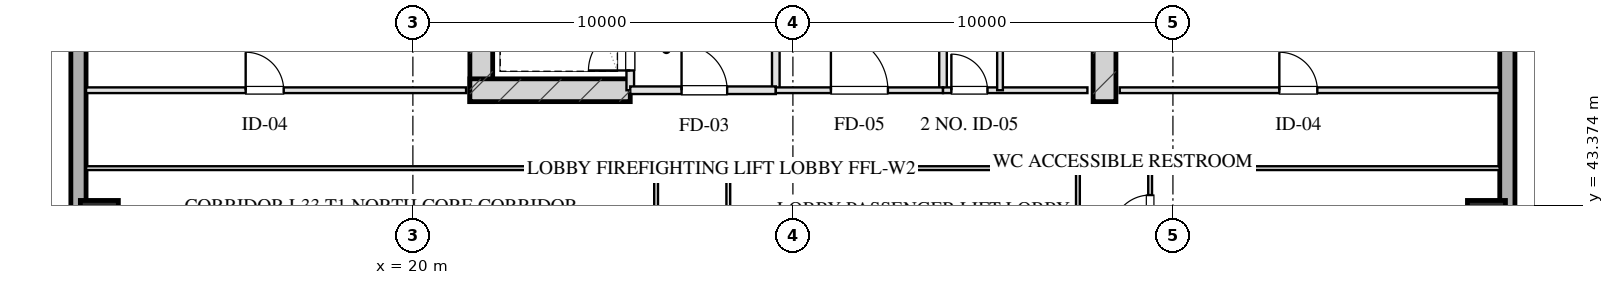
"""IFC4 building model, lengths in metres.
Left out: names, types, materials, properties, quantities, classifications, styles, units other than length and angle.
Written with IfcOpenShell. Run it as: python <this file> out.ifc"""

import sys

from ifc_helpers import new_model, si_unit, direction, frame, frame_2d, origin, origin_2d, place, context, subcontext, project, spatial, rectangle, hollow_rectangle, extrude, element, fill, save


model = new_model("IFC4")
c1 = context("Model", 3, precision=1e-05, world=origin(), true_north=direction((0.0, 1.0)))
c2 = subcontext(c1, "Body", "Model", "MODEL_VIEW")
j1 = project(units=[si_unit("LENGTHUNIT", "METRE"), si_unit("PLANEANGLEUNIT", "RADIAN")], contexts=[c1])
p1 = place(None, origin())
s1 = spatial("IfcSite", under=j1, at=p1, CompositionType="ELEMENT")
p2 = place(p1, origin())
s2 = spatial("IfcBuilding", under=s1, at=p2, CompositionType="ELEMENT")
p3 = place(p2, frame((0.0, 0.0, 127.65)))
s3 = spatial("IfcBuildingStorey", under=s2, at=p3, CompositionType="ELEMENT", Elevation=127.65)
for number, where, z_axis, x_axis in (
    (1, (21.8, 46.1, 0.0), (0.0, 0.0, 1.0), (0.0, 1.0, 0.0)),
    (2, (38.2, 46.1, 0.0), (0.0, 0.0, 1.0), (0.0, 1.0, 0.0)),
):
    element("IfcWall", number, at=place(p3, frame(where, z_axis=z_axis, x_axis=x_axis)), inside=s3, PredefinedType="SHEAR", context=c2, shape_type="SweptSolid", body=[
        extrude(rectangle(XDim=9.48, YDim=0.6, at=frame_2d((4.74, 0.0))), origin(), (0.0, 0.0, 1.0), 3.45),
    ])
p4 = place(p3, frame((21.5, 46.4, 0.0), z_axis=(0.0, 0.0, 1.0), x_axis=(1.0, 0.0, 0.0)))
e3 = element("IfcWall", 3, at=p4, inside=s3, PredefinedType="SHEAR", context=c2, shape_type="SweptSolid", body=[
    extrude(rectangle(XDim=4.22, YDim=0.6, at=frame_2d((2.11, 0.0))), origin(), (0.0, 0.0, 1.0), 3.45),
])
for number, where, z_axis, x_axis in (
    (4, (11.75, 43.0, 0.0), (0.0, 0.0, 1.0), (1.0, 0.0, 0.0)),
    (5, (48.25, 43.0, 0.0), (0.0, 0.0, 1.0), (1.0, 0.0, 0.0)),
):
    element("IfcColumn", number, at=place(p3, frame(where, z_axis=z_axis, x_axis=x_axis)), inside=s3, PredefinedType="COLUMN", context=c2, shape_type="SweptSolid", body=[
        extrude(hollow_rectangle(XDim=1.0, YDim=1.0, WallThickness=0.036, at=origin_2d()), origin(), (0.0, 0.0, 1.0), 3.451),
    ])
p5 = place(p3, frame((11.2, 9.0, 0.0), z_axis=(0.0, 0.0, 1.0), x_axis=(0.0, 1.0, 0.0)))
e6 = element("IfcWall", 6, at=p5, inside=s3, PredefinedType="SOLIDWALL", context=c2, shape_type="SweptSolid", body=[
    extrude(rectangle(XDim=50.0, YDim=0.4, at=frame_2d((25.0, 0.0))), origin(), (0.0, 0.0, 1.0), 2.61),
])
p6 = place(p5, frame((17.475, 0.0, 0.75)))
e7 = element("IfcOpeningElement", 7, at=p6, cuts=e6, PredefinedType="OPENING", context=c2, shape_type="SweptSolid", body=[
    extrude(rectangle(XDim=2.25, YDim=1.46, at=frame_2d((1.125, 0.73))), frame((0.0, 0.21, 0.0), z_axis=(0.0, -1.0, 0.0), x_axis=(1.0, 0.0, 0.0)), (0.0, 0.0, 1.0), 0.42),
])
p7 = place(p5, frame((21.275, 0.0, 0.75)))
e8 = element("IfcOpeningElement", 8, at=p7, cuts=e6, PredefinedType="OPENING", context=c2, shape_type="SweptSolid", body=[
    extrude(rectangle(XDim=2.25, YDim=1.46, at=frame_2d((1.125, 0.73))), frame((0.0, 0.21, 0.0), z_axis=(0.0, -1.0, 0.0), x_axis=(1.0, 0.0, 0.0)), (0.0, 0.0, 1.0), 0.42),
])
p8 = place(p5, frame((26.475, 0.0, 0.75)))
e9 = element("IfcOpeningElement", 9, at=p8, cuts=e6, PredefinedType="OPENING", context=c2, shape_type="SweptSolid", body=[
    extrude(rectangle(XDim=2.25, YDim=1.46, at=frame_2d((1.125, 0.73))), frame((0.0, 0.21, 0.0), z_axis=(0.0, -1.0, 0.0), x_axis=(1.0, 0.0, 0.0)), (0.0, 0.0, 1.0), 0.42),
])
p9 = place(p5, frame((30.275, 0.0, 0.75)))
e10 = element("IfcOpeningElement", 10, at=p9, cuts=e6, PredefinedType="OPENING", context=c2, shape_type="SweptSolid", body=[
    extrude(rectangle(XDim=2.25, YDim=1.46, at=frame_2d((1.125, 0.73))), frame((0.0, 0.21, 0.0), z_axis=(0.0, -1.0, 0.0), x_axis=(1.0, 0.0, 0.0)), (0.0, 0.0, 1.0), 0.42),
])
p10 = place(p3, frame((48.8, 59.0, 0.0), z_axis=(0.0, 0.0, 1.0), x_axis=(0.0, -1.0, 0.0)))
e11 = element("IfcWall", 11, at=p10, inside=s3, PredefinedType="SOLIDWALL", context=c2, shape_type="SweptSolid", body=[
    extrude(rectangle(XDim=50.0, YDim=0.4, at=frame_2d((25.0, 0.0))), origin(), (0.0, 0.0, 1.0), 2.61),
])
p11 = place(p10, frame((21.275, 0.0, 0.75)))
e12 = element("IfcOpeningElement", 12, at=p11, cuts=e11, PredefinedType="OPENING", context=c2, shape_type="SweptSolid", body=[
    extrude(rectangle(XDim=2.25, YDim=1.46, at=frame_2d((1.125, 0.73))), frame((0.0, 0.21, 0.0), z_axis=(0.0, -1.0, 0.0), x_axis=(1.0, 0.0, 0.0)), (0.0, 0.0, 1.0), 0.42),
])
p12 = place(p10, frame((17.475, 0.0, 0.75)))
e13 = element("IfcOpeningElement", 13, at=p12, cuts=e11, PredefinedType="OPENING", context=c2, shape_type="SweptSolid", body=[
    extrude(rectangle(XDim=2.25, YDim=1.46, at=frame_2d((1.125, 0.73))), frame((0.0, 0.21, 0.0), z_axis=(0.0, -1.0, 0.0), x_axis=(1.0, 0.0, 0.0)), (0.0, 0.0, 1.0), 0.42),
])
p13 = place(p3, frame((25.72, 46.4, 0.0), z_axis=(0.0, 0.0, 1.0), x_axis=(0.0, 1.0, 0.0)))
e14 = element("IfcWall", 14, at=p13, inside=s3, PredefinedType="PARTITIONING", context=c2, shape_type="SweptSolid", body=[
    extrude(rectangle(XDim=1.9, YDim=0.2, at=frame_2d((0.95, 0.0))), origin(), (0.0, 0.0, 1.0), 3.175),
])
p14 = place(p13, frame((0.52, 0.0, 0.0)))
e15 = element("IfcOpeningElement", 15, at=p14, cuts=e14, PredefinedType="OPENING", context=c2, shape_type="SweptSolid", body=[
    extrude(rectangle(XDim=1.1, YDim=2.05, at=frame_2d((0.55, 1.025))), frame((0.0, 0.11, 0.0), z_axis=(0.0, -1.0, 0.0), x_axis=(1.0, 0.0, 0.0)), (0.0, 0.0, 1.0), 0.22),
])
p15 = place(p3, frame((29.55, 46.4, 0.0), z_axis=(0.0, 0.0, 1.0), x_axis=(0.0, 1.0, 0.0)))
e16 = element("IfcWall", 16, at=p15, inside=s3, PredefinedType="PARTITIONING", context=c2, shape_type="SweptSolid", body=[
    extrude(rectangle(XDim=8.43, YDim=0.2, at=frame_2d((4.215, 0.0))), origin(), (0.0, 0.0, 1.0), 3.175),
])
p16 = place(p3, frame((25.72, 46.4, 0.0), z_axis=(0.0, 0.0, 1.0), x_axis=(1.0, 0.0, 0.0)))
e17 = element("IfcWall", 17, at=p16, inside=s3, PredefinedType="PARTITIONING", context=c2, shape_type="SweptSolid", body=[
    extrude(rectangle(XDim=3.83, YDim=0.2, at=frame_2d((1.915, 0.0))), origin(), (0.0, 0.0, 1.0), 3.175),
])
p17 = place(p16, frame((1.35, 0.0, 0.0)))
e18 = element("IfcOpeningElement", 18, at=p17, cuts=e17, PredefinedType="OPENING", context=c2, shape_type="SweptSolid", body=[
    extrude(rectangle(XDim=1.2, YDim=2.05, at=frame_2d((0.6, 1.025))), frame((0.0, 0.11, 0.0), z_axis=(0.0, -1.0, 0.0), x_axis=(1.0, 0.0, 0.0)), (0.0, 0.0, 1.0), 0.22),
])
p18 = place(p3, frame((33.95, 46.4, 0.0), z_axis=(0.0, 0.0, 1.0), x_axis=(0.0, 1.0, 0.0)))
e19 = element("IfcWall", 19, at=p18, inside=s3, PredefinedType="PARTITIONING", context=c2, shape_type="SweptSolid", body=[
    extrude(rectangle(XDim=8.43, YDim=0.2, at=frame_2d((4.215, 0.0))), origin(), (0.0, 0.0, 1.0), 3.175),
])
p19 = place(p3, frame((29.55, 46.4, 0.0), z_axis=(0.0, 0.0, 1.0), x_axis=(1.0, 0.0, 0.0)))
e20 = element("IfcWall", 20, at=p19, inside=s3, PredefinedType="PARTITIONING", context=c2, shape_type="SweptSolid", body=[
    extrude(rectangle(XDim=4.4, YDim=0.15, at=frame_2d((2.2, 0.0))), origin(), (0.0, 0.0, 1.0), 3.175),
])
p20 = place(p19, frame((1.45, 0.0, 0.0)))
e21 = element("IfcOpeningElement", 21, at=p20, cuts=e20, PredefinedType="OPENING", context=c2, shape_type="SweptSolid", body=[
    extrude(rectangle(XDim=1.5, YDim=2.05, at=frame_2d((0.75, 1.025))), frame((0.0, 0.085, 0.0), z_axis=(0.0, -1.0, 0.0), x_axis=(1.0, 0.0, 0.0)), (0.0, 0.0, 1.0), 0.17),
])
p21 = place(p3, frame((33.95, 46.4, 0.0), z_axis=(0.0, 0.0, 1.0), x_axis=(1.0, 0.0, 0.0)))
e22 = element("IfcWall", 22, at=p21, inside=s3, PredefinedType="PARTITIONING", context=c2, shape_type="SweptSolid", body=[
    extrude(rectangle(XDim=3.8, YDim=0.15, at=frame_2d((1.9, 0.0))), origin(), (0.0, 0.0, 1.0), 3.175),
])
p22 = place(p21, frame((0.22, 0.0, 0.0)))
e23 = element("IfcOpeningElement", 23, at=p22, cuts=e22, PredefinedType="OPENING", context=c2, shape_type="SweptSolid", body=[
    extrude(rectangle(XDim=0.95, YDim=2.05, at=frame_2d((0.475, 1.025))), frame((0.0, 0.085, 0.0), z_axis=(0.0, -1.0, 0.0), x_axis=(1.0, 0.0, 0.0)), (0.0, 0.0, 1.0), 0.17),
])
p23 = place(p3, frame((35.45, 46.4, 0.0), z_axis=(0.0, 0.0, 1.0), x_axis=(0.0, 1.0, 0.0)))
e24 = element("IfcWall", 24, at=p23, inside=s3, PredefinedType="PARTITIONING", context=c2, shape_type="SweptSolid", body=[
    extrude(rectangle(XDim=8.43, YDim=0.15, at=frame_2d((4.215, 0.0))), origin(), (0.0, 0.0, 1.0), 2.815),
])
p24 = place(p23, frame((2.55, 0.0, 0.0)))
e25 = element("IfcOpeningElement", 25, at=p24, cuts=e24, PredefinedType="OPENING", context=c2, shape_type="SweptSolid", body=[
    extrude(rectangle(XDim=0.95, YDim=2.05, at=frame_2d((0.475, 1.025))), frame((0.0, 0.085, 0.0), z_axis=(0.0, -1.0, 0.0), x_axis=(1.0, 0.0, 0.0)), (0.0, 0.0, 1.0), 0.17),
])
p25 = place(p23, frame((5.8, 0.0, 0.0)))
e26 = element("IfcOpeningElement", 26, at=p25, cuts=e24, PredefinedType="OPENING", context=c2, shape_type="SweptSolid", body=[
    extrude(rectangle(XDim=0.9, YDim=2.05, at=frame_2d((0.45, 1.025))), frame((0.0, 0.085, 0.0), z_axis=(0.0, -1.0, 0.0), x_axis=(1.0, 0.0, 0.0)), (0.0, 0.0, 1.0), 0.17),
])
p26 = place(p3, frame((11.4, 46.4, 0.0), z_axis=(0.0, 0.0, 1.0), x_axis=(1.0, 0.0, 0.0)))
e27 = element("IfcWall", 27, at=p26, inside=s3, PredefinedType="PARTITIONING", context=c2, shape_type="SweptSolid", body=[
    extrude(rectangle(XDim=10.0, YDim=0.15, at=frame_2d((5.0, 0.0))), origin(), (0.0, 0.0, 1.0), 3.175),
])
p27 = place(p26, frame((4.2, 0.0, 0.0)))
e28 = element("IfcOpeningElement", 28, at=p27, cuts=e27, PredefinedType="OPENING", context=c2, shape_type="SweptSolid", body=[
    extrude(rectangle(XDim=1.0, YDim=2.05, at=frame_2d((0.5, 1.025))), frame((0.0, 0.085, 0.0), z_axis=(0.0, -1.0, 0.0), x_axis=(1.0, 0.0, 0.0)), (0.0, 0.0, 1.0), 0.17),
])
p28 = place(p3, frame((38.6, 46.4, 0.0), z_axis=(0.0, 0.0, 1.0), x_axis=(1.0, 0.0, 0.0)))
e29 = element("IfcWall", 29, at=p28, inside=s3, PredefinedType="PARTITIONING", context=c2, shape_type="SweptSolid", body=[
    extrude(rectangle(XDim=10.0, YDim=0.15, at=frame_2d((5.0, 0.0))), origin(), (0.0, 0.0, 1.0), 3.175),
])
p29 = place(p28, frame((4.2, 0.0, 0.0)))
e30 = element("IfcOpeningElement", 30, at=p29, cuts=e29, PredefinedType="OPENING", context=c2, shape_type="SweptSolid", body=[
    extrude(rectangle(XDim=1.0, YDim=2.05, at=frame_2d((0.5, 1.025))), frame((0.0, 0.085, 0.0), z_axis=(0.0, -1.0, 0.0), x_axis=(1.0, 0.0, 0.0)), (0.0, 0.0, 1.0), 0.17),
])
p30 = place(p3, frame((11.4, 44.35, 0.0), z_axis=(0.0, 0.0, 1.0), x_axis=(1.0, 0.0, 0.0)))
e31 = element("IfcWall", 31, at=p30, inside=s3, PredefinedType="MOVABLE", context=c2, shape_type="SweptSolid", body=[
    extrude(rectangle(XDim=15.0, YDim=0.1, at=frame_2d((7.5, 0.0))), origin(), (0.0, 0.0, 1.0), 3.175),
])
p31 = place(p3, frame((28.3, 44.35, 0.0), z_axis=(0.0, 0.0, 1.0), x_axis=(1.0, 0.0, 0.0)))
e32 = element("IfcWall", 32, at=p31, inside=s3, PredefinedType="MOVABLE", context=c2, shape_type="SweptSolid", body=[
    extrude(rectangle(XDim=9.2, YDim=0.1, at=frame_2d((4.6, 0.0))), origin(), (0.0, 0.0, 1.0), 3.175),
])
p32 = place(p3, frame((39.4, 44.35, 0.0), z_axis=(0.0, 0.0, 1.0), x_axis=(1.0, 0.0, 0.0)))
e33 = element("IfcWall", 33, at=p32, inside=s3, PredefinedType="MOVABLE", context=c2, shape_type="SweptSolid", body=[
    extrude(rectangle(XDim=9.2, YDim=0.1, at=frame_2d((4.6, 0.0))), origin(), (0.0, 0.0, 1.0), 3.175),
])
p33 = place(p3, frame((26.4, 23.65, 0.0), z_axis=(0.0, 0.0, 1.0), x_axis=(0.0, 1.0, 0.0)))
e34 = element("IfcWall", 34, at=p33, inside=s3, PredefinedType="MOVABLE", context=c2, shape_type="SweptSolid", body=[
    extrude(rectangle(XDim=20.7, YDim=0.1, at=frame_2d((10.35, 0.0))), origin(), (0.0, 0.0, 1.0), 3.175),
])
p34 = place(p33, frame((4.124, 0.0, 0.0)))
e35 = element("IfcOpeningElement", 35, at=p34, cuts=e34, PredefinedType="OPENING", context=c2, shape_type="SweptSolid", body=[
    extrude(rectangle(XDim=1.0, YDim=2.05, at=frame_2d((0.5, 1.025))), frame((0.0, 0.06, 0.0), z_axis=(0.0, -1.0, 0.0), x_axis=(1.0, 0.0, 0.0)), (0.0, 0.0, 1.0), 0.12),
])
p35 = place(p33, frame((14.473, 0.0, 0.0)))
e36 = element("IfcOpeningElement", 36, at=p35, cuts=e34, PredefinedType="OPENING", context=c2, shape_type="SweptSolid", body=[
    extrude(rectangle(XDim=1.0, YDim=2.05, at=frame_2d((0.5, 1.025))), frame((0.0, 0.06, 0.0), z_axis=(0.0, -1.0, 0.0), x_axis=(1.0, 0.0, 0.0)), (0.0, 0.0, 1.0), 0.12),
])
p36 = place(p3, frame((28.3, 23.65, 0.0), z_axis=(0.0, 0.0, 1.0), x_axis=(0.0, 1.0, 0.0)))
e37 = element("IfcWall", 37, at=p36, inside=s3, PredefinedType="MOVABLE", context=c2, shape_type="SweptSolid", body=[
    extrude(rectangle(XDim=20.7, YDim=0.1, at=frame_2d((10.35, 0.0))), origin(), (0.0, 0.0, 1.0), 3.175),
])
p37 = place(p36, frame((4.117, 0.0, 0.0)))
e38 = element("IfcOpeningElement", 38, at=p37, cuts=e37, PredefinedType="OPENING", context=c2, shape_type="SweptSolid", body=[
    extrude(rectangle(XDim=1.1, YDim=2.05, at=frame_2d((0.55, 1.025))), frame((0.0, 0.06, 0.0), z_axis=(0.0, -1.0, 0.0), x_axis=(1.0, 0.0, 0.0)), (0.0, 0.0, 1.0), 0.12),
])
p38 = place(p36, frame((14.347, 0.0, 0.0)))
e39 = element("IfcOpeningElement", 39, at=p38, cuts=e37, PredefinedType="OPENING", context=c2, shape_type="SweptSolid", body=[
    extrude(rectangle(XDim=1.1, YDim=2.05, at=frame_2d((0.55, 1.025))), frame((0.0, 0.06, 0.0), z_axis=(0.0, -1.0, 0.0), x_axis=(1.0, 0.0, 0.0)), (0.0, 0.0, 1.0), 0.12),
])
p39 = place(p3, frame((37.5, 23.65, 0.0), z_axis=(0.0, 0.0, 1.0), x_axis=(0.0, 1.0, 0.0)))
e40 = element("IfcWall", 40, at=p39, inside=s3, PredefinedType="MOVABLE", context=c2, shape_type="SweptSolid", body=[
    extrude(rectangle(XDim=20.7, YDim=0.1, at=frame_2d((10.35, 0.0))), origin(), (0.0, 0.0, 1.0), 3.175),
])
p40 = place(p3, frame((39.4, 23.65, 0.0), z_axis=(0.0, 0.0, 1.0), x_axis=(0.0, 1.0, 0.0)))
e41 = element("IfcWall", 41, at=p40, inside=s3, PredefinedType="MOVABLE", context=c2, shape_type="SweptSolid", body=[
    extrude(rectangle(XDim=20.7, YDim=0.1, at=frame_2d((10.35, 0.0))), origin(), (0.0, 0.0, 1.0), 3.175),
])
p41 = place(p40, frame((0.775, 0.0, 0.0)))
e42 = element("IfcOpeningElement", 42, at=p41, cuts=e41, PredefinedType="OPENING", context=c2, shape_type="SweptSolid", body=[
    extrude(rectangle(XDim=1.05, YDim=2.05, at=frame_2d((0.525, 1.025))), frame((0.0, 0.06, 0.0), z_axis=(0.0, -1.0, 0.0), x_axis=(1.0, 0.0, 0.0)), (0.0, 0.0, 1.0), 0.12),
])
p42 = place(p40, frame((3.95, 0.0, 0.0)))
e43 = element("IfcOpeningElement", 43, at=p42, cuts=e41, PredefinedType="OPENING", context=c2, shape_type="SweptSolid", body=[
    extrude(rectangle(XDim=1.0, YDim=2.05, at=frame_2d((0.5, 1.025))), frame((0.0, 0.06, 0.0), z_axis=(0.0, -1.0, 0.0), x_axis=(1.0, 0.0, 0.0)), (0.0, 0.0, 1.0), 0.12),
])
p43 = place(p40, frame((8.298, 0.0, 0.0)))
e44 = element("IfcOpeningElement", 44, at=p43, cuts=e41, PredefinedType="OPENING", context=c2, shape_type="SweptSolid", body=[
    extrude(rectangle(XDim=1.0, YDim=2.05, at=frame_2d((0.5, 1.025))), frame((0.0, 0.06, 0.0), z_axis=(0.0, -1.0, 0.0), x_axis=(1.0, 0.0, 0.0)), (0.0, 0.0, 1.0), 0.12),
])
p44 = place(p40, frame((12.712, 0.0, 0.0)))
e45 = element("IfcOpeningElement", 45, at=p44, cuts=e41, PredefinedType="OPENING", context=c2, shape_type="SweptSolid", body=[
    extrude(rectangle(XDim=1.0, YDim=2.05, at=frame_2d((0.5, 1.025))), frame((0.0, 0.06, 0.0), z_axis=(0.0, -1.0, 0.0), x_axis=(1.0, 0.0, 0.0)), (0.0, 0.0, 1.0), 0.12),
])
p45 = place(p40, frame((16.231, 0.0, 0.0)))
e46 = element("IfcOpeningElement", 46, at=p45, cuts=e41, PredefinedType="OPENING", context=c2, shape_type="SweptSolid", body=[
    extrude(rectangle(XDim=1.0, YDim=2.05, at=frame_2d((0.5, 1.025))), frame((0.0, 0.06, 0.0), z_axis=(0.0, -1.0, 0.0), x_axis=(1.0, 0.0, 0.0)), (0.0, 0.0, 1.0), 0.12),
])
p46 = place(p40, frame((18.992, 0.0, 0.0)))
e47 = element("IfcOpeningElement", 47, at=p46, cuts=e41, PredefinedType="OPENING", context=c2, shape_type="SweptSolid", body=[
    extrude(rectangle(XDim=1.0, YDim=2.05, at=frame_2d((0.5, 1.025))), frame((0.0, 0.06, 0.0), z_axis=(0.0, -1.0, 0.0), x_axis=(1.0, 0.0, 0.0)), (0.0, 0.0, 1.0), 0.12),
])
p47 = place(p14, origin())
e48 = element("IfcDoor", 48, at=p47, inside=s3, OperationType="SINGLE_SWING_LEFT", PredefinedType="DOOR", context=c2, shape_type="SweptSolid", body=[
    extrude(rectangle(XDim=1.1, YDim=2.05, at=frame_2d((0.55, 1.025))), frame((0.0, 0.025, 0.0), z_axis=(0.0, -1.0, 0.0), x_axis=(1.0, 0.0, 0.0)), (0.0, 0.0, 1.0), 0.05),
])
fill(e15, e48)
p48 = place(p17, origin())
e49 = element("IfcDoor", 49, at=p48, inside=s3, OperationType="SINGLE_SWING_LEFT", PredefinedType="DOOR", context=c2, shape_type="SweptSolid", body=[
    extrude(rectangle(XDim=1.2, YDim=2.05, at=frame_2d((0.6, 1.025))), frame((0.0, 0.025, 0.0), z_axis=(0.0, -1.0, 0.0), x_axis=(1.0, 0.0, 0.0)), (0.0, 0.0, 1.0), 0.05),
])
fill(e18, e49)
p49 = place(p20, origin())
e50 = element("IfcDoor", 50, at=p49, inside=s3, OperationType="SINGLE_SWING_LEFT", PredefinedType="DOOR", context=c2, shape_type="SweptSolid", body=[
    extrude(rectangle(XDim=1.5, YDim=2.05, at=frame_2d((0.75, 1.025))), frame((0.0, 0.025, 0.0), z_axis=(0.0, -1.0, 0.0), x_axis=(1.0, 0.0, 0.0)), (0.0, 0.0, 1.0), 0.05),
])
fill(e21, e50)
p50 = place(p22, origin())
e51 = element("IfcDoor", 51, at=p50, inside=s3, OperationType="SINGLE_SWING_LEFT", PredefinedType="DOOR", context=c2, shape_type="SweptSolid", body=[
    extrude(rectangle(XDim=0.95, YDim=2.05, at=frame_2d((0.475, 1.025))), frame((0.0, 0.025, 0.0), z_axis=(0.0, -1.0, 0.0), x_axis=(1.0, 0.0, 0.0)), (0.0, 0.0, 1.0), 0.05),
])
fill(e23, e51)
p51 = place(p27, origin())
e52 = element("IfcDoor", 52, at=p51, inside=s3, OperationType="SINGLE_SWING_LEFT", PredefinedType="DOOR", context=c2, shape_type="SweptSolid", body=[
    extrude(rectangle(XDim=1.0, YDim=2.05, at=frame_2d((0.5, 1.025))), frame((0.0, 0.025, 0.0), z_axis=(0.0, -1.0, 0.0), x_axis=(1.0, 0.0, 0.0)), (0.0, 0.0, 1.0), 0.05),
])
fill(e28, e52)
p52 = place(p29, origin())
e53 = element("IfcDoor", 53, at=p52, inside=s3, OperationType="SINGLE_SWING_LEFT", PredefinedType="DOOR", context=c2, shape_type="SweptSolid", body=[
    extrude(rectangle(XDim=1.0, YDim=2.05, at=frame_2d((0.5, 1.025))), frame((0.0, 0.025, 0.0), z_axis=(0.0, -1.0, 0.0), x_axis=(1.0, 0.0, 0.0)), (0.0, 0.0, 1.0), 0.05),
])
fill(e30, e53)
p53 = place(p46, origin())
e54 = element("IfcDoor", 54, at=p53, inside=s3, OperationType="SINGLE_SWING_LEFT", PredefinedType="DOOR", context=c2, shape_type="SweptSolid", body=[
    extrude(rectangle(XDim=1.0, YDim=2.05, at=frame_2d((0.5, 1.025))), frame((0.0, 0.025, 0.0), z_axis=(0.0, -1.0, 0.0), x_axis=(1.0, 0.0, 0.0)), (0.0, 0.0, 1.0), 0.05),
])
fill(e47, e54)
save(model, sys.argv[1])
